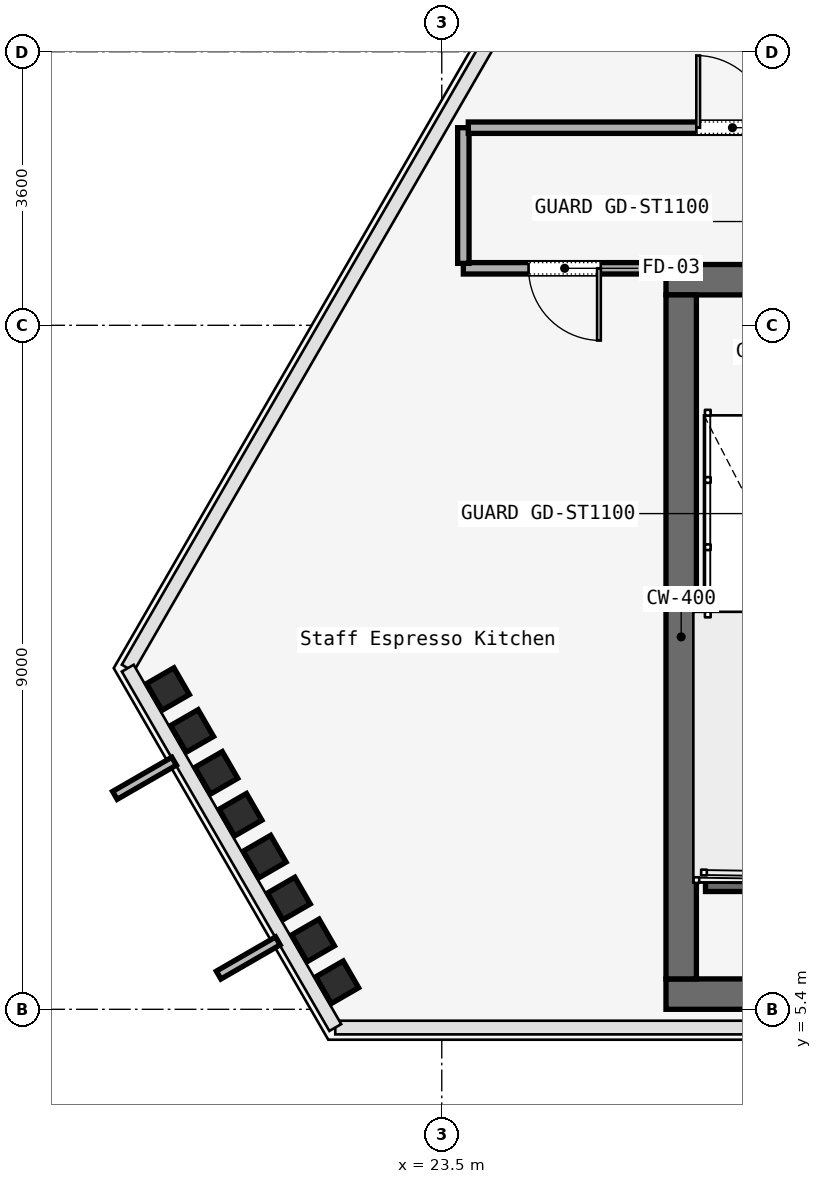
"""IFC4 building model, lengths in metres.
Left out: names, types, materials, properties, quantities, classifications, styles, units other than length and angle.
Written with IfcOpenShell. Run it as: python <this file> out.ifc"""

import sys

from ifc_helpers import new_model, si_unit, direction, frame, frame_2d, origin, origin_2d, place, context, subcontext, project, spatial, rectangle, i_section, extrude, element, fill, save


model = new_model("IFC4")
c1 = context("Model", 3, precision=1e-05, world=origin(), true_north=direction((0.0, 1.0)))
c2 = subcontext(c1, "Body", "Model", "MODEL_VIEW")
j1 = project(units=[si_unit("LENGTHUNIT", "METRE"), si_unit("PLANEANGLEUNIT", "RADIAN")], contexts=[c1])
p1 = place(None, origin())
s1 = spatial("IfcSite", under=j1, at=p1, CompositionType="ELEMENT")
p2 = place(p1, origin())
s2 = spatial("IfcBuilding", under=s1, at=p2, CompositionType="ELEMENT")
p3 = place(p2, frame((0.0, 0.0, 263.6)))
s3 = spatial("IfcBuildingStorey", under=s2, at=p3, CompositionType="ELEMENT", Elevation=263.6)
p4 = place(p3, frame((26.45, 15.0, 0.0), z_axis=(0.0, 0.0, 1.0), x_axis=(1.0, 0.0, 0.0)))
e1 = element("IfcWall", 1, at=p4, inside=s3, PredefinedType="SOLIDWALL", context=c2, shape_type="SweptSolid", body=[
    extrude(rectangle(XDim=31.1, YDim=0.4, at=frame_2d((15.55, 0.0))), origin(), (0.0, 0.0, 1.0), 3.58),
])
p5 = place(p4, frame((1.65, 0.0, 0.0)))
e2 = element("IfcOpeningElement", 2, at=p5, cuts=e1, PredefinedType="OPENING", context=c2, shape_type="SweptSolid", body=[
    extrude(rectangle(XDim=1.1, YDim=2.2, at=frame_2d((0.55, 1.1))), frame((0.0, 0.2, 0.0), z_axis=(0.0, -1.0, 0.0), x_axis=(1.0, 0.0, 0.0)), (0.0, 0.0, 1.0), 0.4),
])
p6 = place(p4, frame((13.65, 0.0, 0.0)))
e3 = element("IfcOpeningElement", 3, at=p6, cuts=e1, PredefinedType="OPENING", context=c2, shape_type="SweptSolid", body=[
    extrude(rectangle(XDim=1.1, YDim=2.2, at=frame_2d((0.55, 1.1))), frame((0.0, 0.2, 0.0), z_axis=(0.0, -1.0, 0.0), x_axis=(1.0, 0.0, 0.0)), (0.0, 0.0, 1.0), 0.4),
])
p7 = place(p4, frame((25.55, 0.0, 0.0)))
e4 = element("IfcOpeningElement", 4, at=p7, cuts=e1, PredefinedType="OPENING", context=c2, shape_type="SweptSolid", body=[
    extrude(rectangle(XDim=1.1, YDim=2.2, at=frame_2d((0.55, 1.1))), frame((0.0, 0.2, 0.0), z_axis=(0.0, -1.0, 0.0), x_axis=(1.0, 0.0, 0.0)), (0.0, 0.0, 1.0), 0.4),
])
p8 = place(p4, frame((19.35, 0.0, 0.0)))
e5 = element("IfcOpeningElement", 5, at=p8, cuts=e1, PredefinedType="OPENING", context=c2, shape_type="SweptSolid", body=[
    extrude(rectangle(XDim=1.1, YDim=2.2, at=frame_2d((0.55, 1.1))), frame((0.0, 0.2, 0.0), z_axis=(0.0, -1.0, 0.0), x_axis=(1.0, 0.0, 0.0)), (0.0, 0.0, 1.0), 0.4),
])
p9 = place(p4, frame((21.4, 0.0, 0.0)))
e6 = element("IfcOpeningElement", 6, at=p9, cuts=e1, PredefinedType="OPENING", context=c2, shape_type="SweptSolid", body=[
    extrude(rectangle(XDim=0.9, YDim=2.1, at=frame_2d((0.45, 1.05))), frame((0.0, 0.2, 0.0), z_axis=(0.0, -1.0, 0.0), x_axis=(1.0, 0.0, 0.0)), (0.0, 0.0, 1.0), 0.4),
])
p10 = place(p4, frame((5.14, 0.0, 0.0)))
e7 = element("IfcOpeningElement", 7, at=p10, cuts=e1, PredefinedType="OPENING", context=c2, shape_type="SweptSolid", body=[
    extrude(rectangle(XDim=0.95, YDim=2.2, at=frame_2d((0.475, 1.1))), frame((0.0, 0.2, 0.0), z_axis=(0.0, -1.0, 0.0), x_axis=(1.0, 0.0, 0.0)), (0.0, 0.0, 1.0), 0.4),
])
p11 = place(p4, frame((7.825, 0.0, 0.0)))
e8 = element("IfcOpeningElement", 8, at=p11, cuts=e1, PredefinedType="OPENING", context=c2, shape_type="SweptSolid", body=[
    extrude(rectangle(XDim=0.95, YDim=2.2, at=frame_2d((0.475, 1.1))), frame((0.0, 0.2, 0.0), z_axis=(0.0, -1.0, 0.0), x_axis=(1.0, 0.0, 0.0)), (0.0, 0.0, 1.0), 0.4),
])
p12 = place(p4, frame((10.46, 0.0, 0.0)))
e9 = element("IfcOpeningElement", 9, at=p12, cuts=e1, PredefinedType="OPENING", context=c2, shape_type="SweptSolid", body=[
    extrude(rectangle(XDim=0.95, YDim=2.2, at=frame_2d((0.475, 1.1))), frame((0.0, 0.2, 0.0), z_axis=(0.0, -1.0, 0.0), x_axis=(1.0, 0.0, 0.0)), (0.0, 0.0, 1.0), 0.4),
])
p13 = place(p4, frame((23.35, 0.0, 0.0)))
e10 = element("IfcOpeningElement", 10, at=p13, cuts=e1, PredefinedType="OPENING", context=c2, shape_type="SweptSolid", body=[
    extrude(rectangle(XDim=1.3, YDim=2.3, at=frame_2d((0.65, 1.15))), frame((0.0, 0.2, 0.0), z_axis=(0.0, -1.0, 0.0), x_axis=(1.0, 0.0, 0.0)), (0.0, 0.0, 1.0), 0.4),
])
p14 = place(p3, frame((26.45, 5.6, 0.0), z_axis=(0.0, 0.0, 1.0), x_axis=(1.0, 0.0, 0.0)))
e11 = element("IfcWall", 11, at=p14, inside=s3, PredefinedType="SOLIDWALL", context=c2, shape_type="SweptSolid", body=[
    extrude(rectangle(XDim=31.1, YDim=0.4, at=frame_2d((15.55, 0.0))), origin(), (0.0, 0.0, 1.0), 3.58),
])
p15 = place(p3, frame((26.65, 5.8, 0.0), z_axis=(0.0, 0.0, 1.0), x_axis=(0.0, 1.0, 0.0)))
e12 = element("IfcWall", 12, at=p15, inside=s3, PredefinedType="SOLIDWALL", context=c2, shape_type="SweptSolid", body=[
    extrude(rectangle(XDim=9.0, YDim=0.4, at=frame_2d((4.5, 0.0))), origin(), (0.0, 0.0, 1.0), 3.58),
])
for number, where, z_axis, x_axis in (
    (13, (19.897, 9.613, 0.0), (0.0, 0.0, 1.0), (-0.5, 0.866, 0.0)),
    (14, (20.216, 9.062, 0.0), (0.0, 0.0, 1.0), (-0.5, 0.866, 0.0)),
    (15, (20.534, 8.511, 0.0), (0.0, 0.0, 1.0), (-0.5, 0.866, 0.0)),
    (16, (20.852, 7.96, 0.0), (0.0, 0.0, 1.0), (-0.5, 0.866, 0.0)),
    (17, (21.17, 7.409, 0.0), (0.0, 0.0, 1.0), (-0.5, 0.866, 0.0)),
    (18, (21.488, 6.858, 0.0), (0.0, 0.0, 1.0), (-0.5, 0.866, 0.0)),
    (19, (21.806, 6.307, 0.0), (0.0, 0.0, 1.0), (-0.5, 0.866, 0.0)),
    (20, (22.125, 5.756, 0.0), (0.0, 0.0, 1.0), (-0.5, 0.866, 0.0)),
):
    element("IfcColumn", number, at=place(p3, frame(where, z_axis=z_axis, x_axis=x_axis)), inside=s3, PredefinedType="COLUMN", context=c2, shape_type="SweptSolid", body=[
        extrude(i_section(OverallWidth=0.406, OverallDepth=0.416, WebThickness=0.03, FlangeThickness=0.037, FilletRadius=0.015, at=origin_2d()), origin(), (0.0, 0.0, 1.0), 3.58),
    ])
p16 = place(p3, frame((26.97, 7.05, 0.0), z_axis=(0.0, 0.0, 1.0), x_axis=(1.0, 0.0, 0.0)))
e21 = element("IfcWall", 21, at=p16, inside=s3, PredefinedType="SOLIDWALL", context=c2, shape_type="SweptSolid", body=[
    extrude(rectangle(XDim=3.115, YDim=0.2, at=frame_2d((1.558, 0.0))), origin(), (0.0, 0.0, 1.0), 3.8),
])
p17 = place(p3, frame((26.45, 15.15, 0.0), z_axis=(0.0, 0.0, 1.0), x_axis=(-1.0, 0.0, 0.0)))
e22 = element("IfcWall", 22, at=p17, inside=s3, PredefinedType="PARTITIONING", context=c2, shape_type="SweptSolid", body=[
    extrude(rectangle(XDim=2.666, YDim=0.15, at=frame_2d((1.333, 0.0))), origin(), (0.0, 0.0, 1.0), 3.01),
])
p18 = place(p17, frame((0.858, 0.0, 0.0)))
e23 = element("IfcOpeningElement", 23, at=p18, cuts=e22, PredefinedType="OPENING", context=c2, shape_type="SweptSolid", body=[
    extrude(rectangle(XDim=0.95, YDim=2.2, at=frame_2d((0.475, 1.1))), frame((0.0, 0.075, 0.0), z_axis=(0.0, -1.0, 0.0), x_axis=(1.0, 0.0, 0.0)), (0.0, 0.0, 1.0), 0.15),
])
p19 = place(p3, frame((23.784, 15.215, 0.0), z_axis=(0.0, 0.0, 1.0), x_axis=(0.0, 1.0, 0.0)))
e24 = element("IfcWall", 24, at=p19, inside=s3, PredefinedType="PARTITIONING", context=c2, shape_type="SweptSolid", body=[
    extrude(rectangle(XDim=1.785, YDim=0.15, at=frame_2d((0.893, 0.0))), origin(), (0.0, 0.0, 1.0), 3.01),
])
p20 = place(p3, frame((23.849, 17.0, 0.0), z_axis=(0.0, 0.0, 1.0), x_axis=(1.0, 0.0, 0.0)))
e25 = element("IfcWall", 25, at=p20, inside=s3, PredefinedType="PARTITIONING", context=c2, shape_type="SweptSolid", body=[
    extrude(rectangle(XDim=6.951, YDim=0.15, at=frame_2d((3.476, 0.0))), origin(), (0.0, 0.0, 1.0), 3.01),
])
p21 = place(p20, frame((3.0, 0.0, 0.0)))
e26 = element("IfcOpeningElement", 26, at=p21, cuts=e25, PredefinedType="OPENING", context=c2, shape_type="SweptSolid", body=[
    extrude(rectangle(XDim=0.95, YDim=2.2, at=frame_2d((0.475, 1.1))), frame((0.0, 0.075, 0.0), z_axis=(0.0, -1.0, 0.0), x_axis=(1.0, 0.0, 0.0)), (0.0, 0.0, 1.0), 0.15),
])
p22 = place(p18, origin())
e27 = element("IfcDoor", 27, at=p22, inside=s3, OperationType="SINGLE_SWING_RIGHT", PredefinedType="DOOR", context=c2, shape_type="SweptSolid", body=[
    extrude(rectangle(XDim=0.95, YDim=2.2, at=frame_2d((0.475, 1.1))), frame((0.0, 0.025, 0.0), z_axis=(0.0, -1.0, 0.0), x_axis=(1.0, 0.0, 0.0)), (0.0, 0.0, 1.0), 0.05),
])
fill(e23, e27)
p23 = place(p21, origin())
e28 = element("IfcDoor", 28, at=p23, inside=s3, OperationType="SINGLE_SWING_LEFT", PredefinedType="DOOR", context=c2, shape_type="SweptSolid", body=[
    extrude(rectangle(XDim=0.95, YDim=2.2, at=frame_2d((0.475, 1.1))), frame((0.0, 0.025, 0.0), z_axis=(0.0, -1.0, 0.0), x_axis=(1.0, 0.0, 0.0)), (0.0, 0.0, 1.0), 0.05),
])
fill(e26, e28)
save(model, sys.argv[1])
